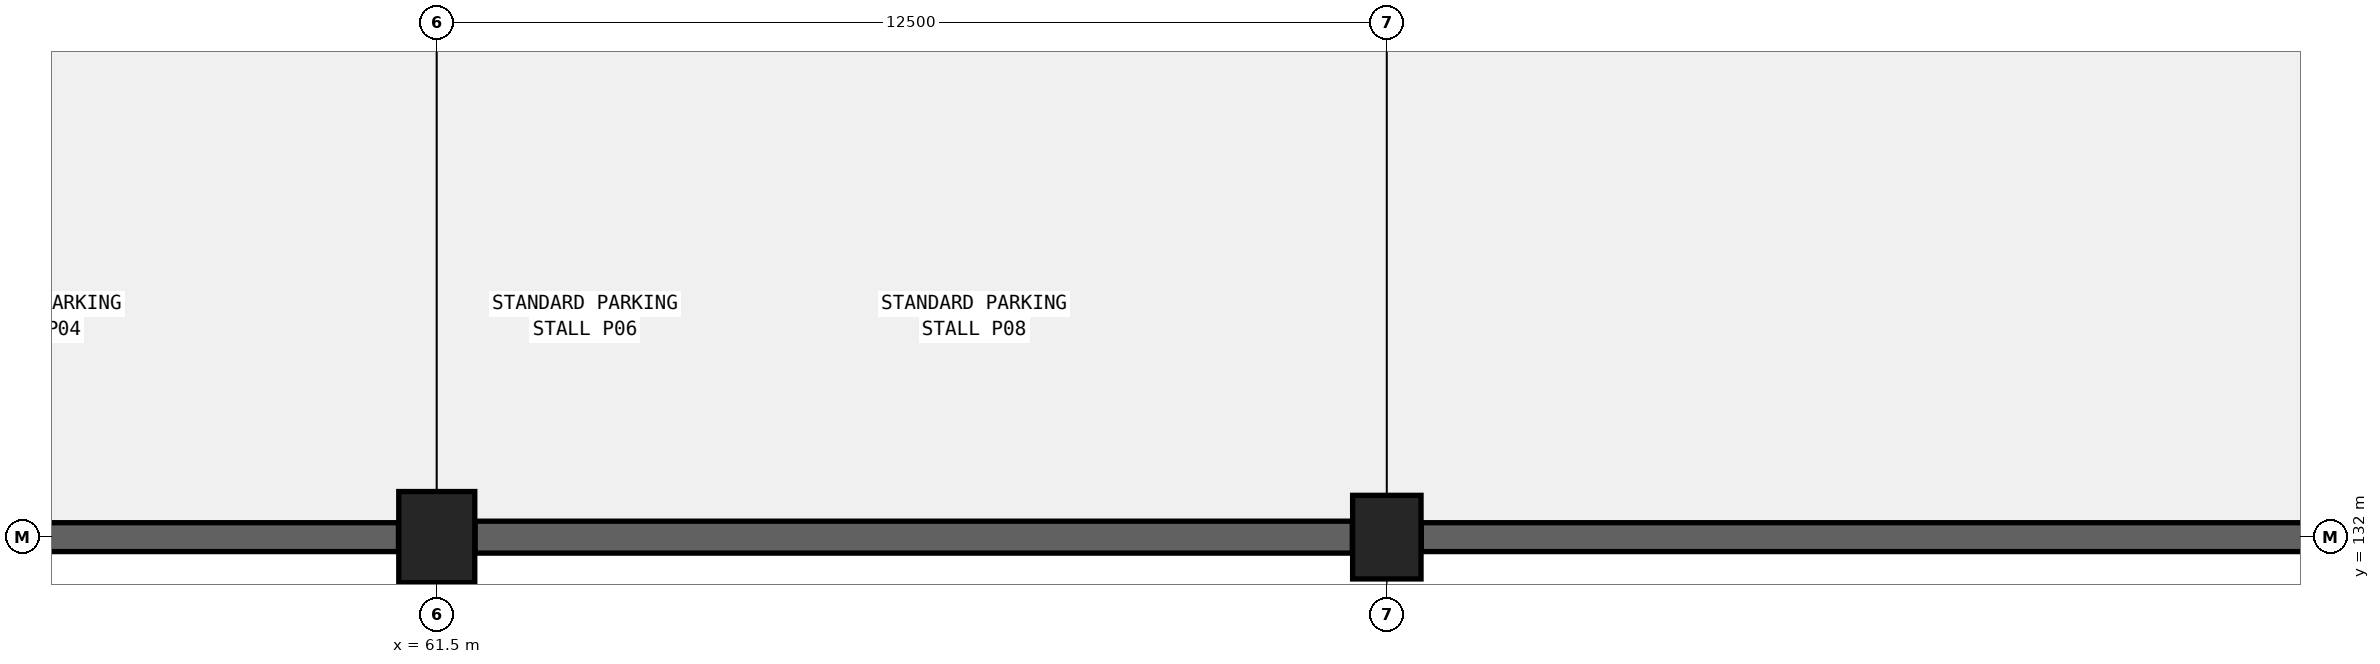
"""IFC4 building model, lengths in metres.
Left out: names, types, materials, properties, quantities, classifications, styles, units other than length and angle.
Written with IfcOpenShell. Run it as: python <this file> out.ifc"""

import sys

from ifc_helpers import new_model, si_unit, direction, frame, frame_2d, origin, origin_2d, place, context, subcontext, project, spatial, rectangle, extrude, element, save


model = new_model("IFC4")
c1 = context("Model", 3, precision=1e-05, world=origin(), true_north=direction((0.0, 1.0)))
c2 = subcontext(c1, "Body", "Model", "MODEL_VIEW")
j1 = project(units=[si_unit("LENGTHUNIT", "METRE"), si_unit("PLANEANGLEUNIT", "RADIAN")], contexts=[c1])
p1 = place(None, origin())
s1 = spatial("IfcSite", under=j1, at=p1, CompositionType="ELEMENT")
p2 = place(p1, origin())
s2 = spatial("IfcBuilding", under=s1, at=p2, CompositionType="ELEMENT")
p3 = place(p2, frame((0.0, 0.0, -4.8)))
s3 = spatial("IfcBuildingStorey", under=s2, at=p3, CompositionType="ELEMENT", Elevation=-4.8)
p4 = place(p3, frame((61.5, 132.0, 0.0), z_axis=(0.0, 0.0, 1.0), x_axis=(1.0, 0.0, 0.0)))
e1 = element("IfcColumn", 1, at=p4, inside=s3, PredefinedType="COLUMN", context=c2, shape_type="SweptSolid", body=[
    extrude(rectangle(XDim=1.0, YDim=1.2, at=origin_2d()), origin(), (0.0, 0.0, 1.0), 4.8),
])
p5 = place(p3, frame((74.0, 132.0, 0.0), z_axis=(0.0, 0.0, 1.0), x_axis=(1.0, 0.0, 0.0)))
e2 = element("IfcColumn", 2, at=p5, inside=s3, PredefinedType="COLUMN", context=c2, shape_type="SweptSolid", body=[
    extrude(rectangle(XDim=0.9, YDim=1.1, at=origin_2d()), origin(), (0.0, 0.0, 1.0), 4.8),
])
p6 = place(p3, frame((49.429, 132.0, 0.0), z_axis=(0.0, 0.0, 1.0), x_axis=(1.0, 0.0, 0.0)))
e3 = element("IfcWall", 3, at=p6, inside=s3, PredefinedType="STANDARD", context=c2, shape_type="SweptSolid", body=[
    extrude(rectangle(XDim=11.567, YDim=0.38, at=frame_2d((5.784, 0.0))), origin(), (0.0, 0.0, 1.0), 4.46),
])
p7 = place(p3, frame((62.004, 132.0, 0.0), z_axis=(0.0, 0.0, 1.0), x_axis=(1.0, 0.0, 0.0)))
e4 = element("IfcWall", 4, at=p7, inside=s3, PredefinedType="STANDARD", context=c2, shape_type="SweptSolid", body=[
    extrude(rectangle(XDim=11.542, YDim=0.42, at=frame_2d((5.771, 0.0))), origin(), (0.0, 0.0, 1.0), 4.46),
])
p8 = place(p3, frame((74.454, 132.0, 0.0), z_axis=(0.0, 0.0, 1.0), x_axis=(1.0, 0.0, 0.0)))
e5 = element("IfcWall", 5, at=p8, inside=s3, PredefinedType="STANDARD", context=c2, shape_type="SweptSolid", body=[
    extrude(rectangle(XDim=11.642, YDim=0.38, at=frame_2d((5.821, 0.0))), origin(), (0.0, 0.0, 1.0), 4.46),
])
save(model, sys.argv[1])
